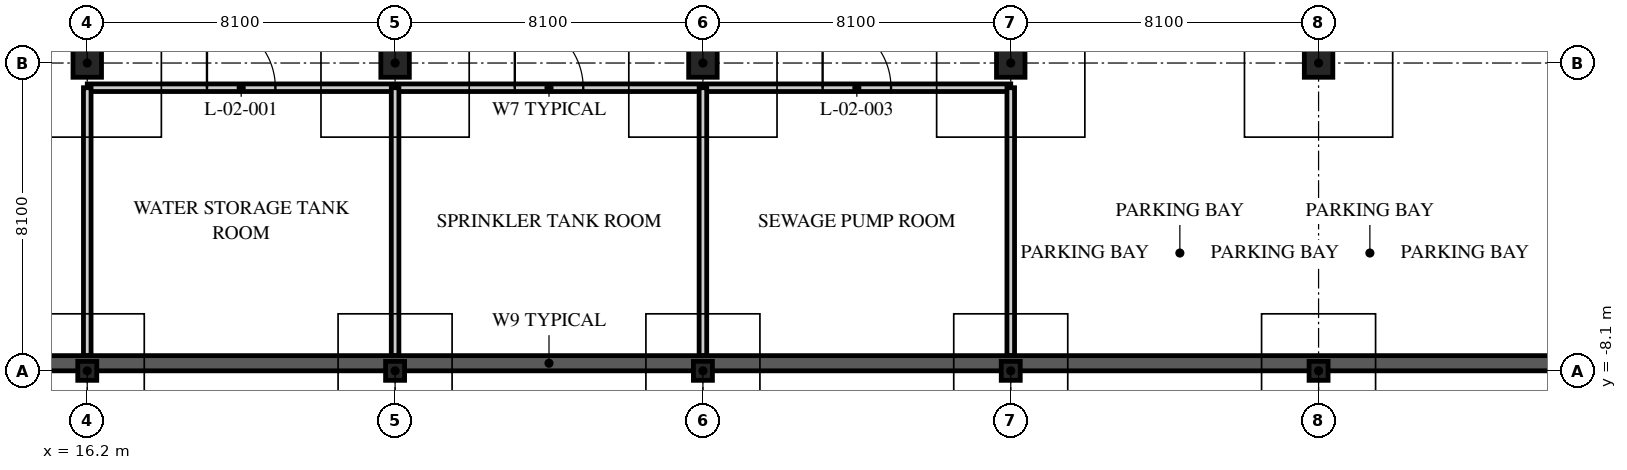
"""IFC4 building model, lengths in metres.
Left out: names, types, materials, properties, quantities, classifications, styles, units other than length and angle.
Written with IfcOpenShell. Run it as: python <this file> out.ifc"""

import sys

from ifc_helpers import new_model, si_unit, direction, frame, frame_2d, origin, origin_2d, place, context, subcontext, project, spatial, rectangle, hollow_rectangle, extrude, element, fill, save


model = new_model("IFC4")
c1 = context("Model", 3, precision=1e-05, world=origin(), true_north=direction((0.0, 1.0)))
c2 = subcontext(c1, "Body", "Model", "MODEL_VIEW")
j1 = project(units=[si_unit("LENGTHUNIT", "METRE"), si_unit("PLANEANGLEUNIT", "RADIAN")], contexts=[c1])
p1 = place(None, origin())
s1 = spatial("IfcSite", under=j1, at=p1, CompositionType="ELEMENT")
p2 = place(p1, origin())
s2 = spatial("IfcBuilding", under=s1, at=p2, CompositionType="ELEMENT")
p3 = place(p2, frame((0.0, 0.0, -8.4)))
s3 = spatial("IfcBuildingStorey", under=s2, at=p3, CompositionType="ELEMENT", Elevation=-8.4)
p4 = place(p3, frame((16.2, -8.1, 0.0), z_axis=(0.0, 0.0, 1.0), x_axis=(1.0, 0.0, 0.0)))
e1 = element("IfcColumn", 1, at=p4, inside=s3, PredefinedType="COLUMN", context=c2, shape_type="SweptSolid", body=[
    extrude(hollow_rectangle(XDim=0.5, YDim=0.5, WallThickness=0.03, at=origin_2d()), origin(), (0.0, 0.0, 1.0), 4.2),
])
p5 = place(p3, frame((16.2, 0.0, 0.0), z_axis=(0.0, 0.0, 1.0), x_axis=(1.0, 0.0, 0.0)))
e2 = element("IfcColumn", 2, at=p5, inside=s3, PredefinedType="COLUMN", context=c2, shape_type="SweptSolid", body=[
    extrude(hollow_rectangle(XDim=0.75, YDim=0.75, WallThickness=0.07, at=origin_2d()), origin(), (0.0, 0.0, 1.0), 4.2),
])
p6 = place(p3, frame((24.3, -8.1, 0.0), z_axis=(0.0, 0.0, 1.0), x_axis=(1.0, 0.0, 0.0)))
e3 = element("IfcColumn", 3, at=p6, inside=s3, PredefinedType="COLUMN", context=c2, shape_type="SweptSolid", body=[
    extrude(hollow_rectangle(XDim=0.5, YDim=0.5, WallThickness=0.03, at=origin_2d()), origin(), (0.0, 0.0, 1.0), 4.2),
])
p7 = place(p3, frame((24.3, 0.0, 0.0), z_axis=(0.0, 0.0, 1.0), x_axis=(1.0, 0.0, 0.0)))
e4 = element("IfcColumn", 4, at=p7, inside=s3, PredefinedType="COLUMN", context=c2, shape_type="SweptSolid", body=[
    extrude(hollow_rectangle(XDim=0.75, YDim=0.75, WallThickness=0.07, at=origin_2d()), origin(), (0.0, 0.0, 1.0), 4.2),
])
p8 = place(p3, frame((32.4, -8.1, 0.0), z_axis=(0.0, 0.0, 1.0), x_axis=(1.0, 0.0, 0.0)))
e5 = element("IfcColumn", 5, at=p8, inside=s3, PredefinedType="COLUMN", context=c2, shape_type="SweptSolid", body=[
    extrude(hollow_rectangle(XDim=0.5, YDim=0.5, WallThickness=0.03, at=origin_2d()), origin(), (0.0, 0.0, 1.0), 4.2),
])
p9 = place(p3, frame((32.4, 0.0, 0.0), z_axis=(0.0, 0.0, 1.0), x_axis=(1.0, 0.0, 0.0)))
e6 = element("IfcColumn", 6, at=p9, inside=s3, PredefinedType="COLUMN", context=c2, shape_type="SweptSolid", body=[
    extrude(hollow_rectangle(XDim=0.75, YDim=0.75, WallThickness=0.07, at=origin_2d()), origin(), (0.0, 0.0, 1.0), 4.2),
])
p10 = place(p3, frame((40.5, -8.1, 0.0), z_axis=(0.0, 0.0, 1.0), x_axis=(1.0, 0.0, 0.0)))
e7 = element("IfcColumn", 7, at=p10, inside=s3, PredefinedType="COLUMN", context=c2, shape_type="SweptSolid", body=[
    extrude(hollow_rectangle(XDim=0.5, YDim=0.5, WallThickness=0.03, at=origin_2d()), origin(), (0.0, 0.0, 1.0), 4.2),
])
p11 = place(p3, frame((40.5, 0.0, 0.0), z_axis=(0.0, 0.0, 1.0), x_axis=(1.0, 0.0, 0.0)))
e8 = element("IfcColumn", 8, at=p11, inside=s3, PredefinedType="COLUMN", context=c2, shape_type="SweptSolid", body=[
    extrude(hollow_rectangle(XDim=0.75, YDim=0.75, WallThickness=0.07, at=origin_2d()), origin(), (0.0, 0.0, 1.0), 4.2),
])
p12 = place(p3, frame((48.6, -8.1, 0.0), z_axis=(0.0, 0.0, 1.0), x_axis=(1.0, 0.0, 0.0)))
e9 = element("IfcColumn", 9, at=p12, inside=s3, PredefinedType="COLUMN", context=c2, shape_type="SweptSolid", body=[
    extrude(hollow_rectangle(XDim=0.5, YDim=0.5, WallThickness=0.03, at=origin_2d()), origin(), (0.0, 0.0, 1.0), 4.2),
])
p13 = place(p3, frame((48.6, 0.0, 0.0), z_axis=(0.0, 0.0, 1.0), x_axis=(1.0, 0.0, 0.0)))
e10 = element("IfcColumn", 10, at=p13, inside=s3, PredefinedType="COLUMN", context=c2, shape_type="SweptSolid", body=[
    extrude(hollow_rectangle(XDim=0.75, YDim=0.75, WallThickness=0.07, at=origin_2d()), origin(), (0.0, 0.0, 1.0), 4.2),
])
p14 = place(p3, frame((16.2, -0.65, 0.0), z_axis=(0.0, 0.0, 1.0), x_axis=(1.0, 0.0, 0.0)))
e11 = element("IfcWall", 11, at=p14, inside=s3, PredefinedType="SOLIDWALL", context=c2, shape_type="SweptSolid", body=[
    extrude(rectangle(XDim=24.3, YDim=0.2, at=frame_2d((12.15, 0.0))), origin(), (0.0, 0.0, 1.0), 3.95),
])
p15 = place(p14, frame((3.15, 0.0, 0.0)))
e12 = element("IfcOpeningElement", 12, at=p15, cuts=e11, PredefinedType="OPENING", context=c2, shape_type="SweptSolid", body=[
    extrude(rectangle(XDim=1.8, YDim=2.4, at=frame_2d((0.9, 1.2))), frame((0.0, 0.11, 0.0), z_axis=(0.0, -1.0, 0.0), x_axis=(1.0, 0.0, 0.0)), (0.0, 0.0, 1.0), 0.22),
])
p16 = place(p14, frame((11.25, 0.0, 0.0)))
e13 = element("IfcOpeningElement", 13, at=p16, cuts=e11, PredefinedType="OPENING", context=c2, shape_type="SweptSolid", body=[
    extrude(rectangle(XDim=1.8, YDim=2.4, at=frame_2d((0.9, 1.2))), frame((0.0, 0.11, 0.0), z_axis=(0.0, -1.0, 0.0), x_axis=(1.0, 0.0, 0.0)), (0.0, 0.0, 1.0), 0.22),
])
p17 = place(p14, frame((19.35, 0.0, 0.0)))
e14 = element("IfcOpeningElement", 14, at=p17, cuts=e11, PredefinedType="OPENING", context=c2, shape_type="SweptSolid", body=[
    extrude(rectangle(XDim=1.8, YDim=2.4, at=frame_2d((0.9, 1.2))), frame((0.0, 0.11, 0.0), z_axis=(0.0, -1.0, 0.0), x_axis=(1.0, 0.0, 0.0)), (0.0, 0.0, 1.0), 0.22),
])
for number, where, z_axis, x_axis in (
    (15, (16.2, -7.7, 0.0), (0.0, 0.0, 1.0), (0.0, 1.0, 0.0)),
    (16, (24.3, -7.7, 0.0), (0.0, 0.0, 1.0), (0.0, 1.0, 0.0)),
    (17, (32.4, -7.7, 0.0), (0.0, 0.0, 1.0), (0.0, 1.0, 0.0)),
    (18, (40.5, -7.7, 0.0), (0.0, 0.0, 1.0), (0.0, 1.0, 0.0)),
):
    element("IfcWall", number, at=place(p3, frame(where, z_axis=z_axis, x_axis=x_axis)), inside=s3, PredefinedType="SOLIDWALL", context=c2, shape_type="SweptSolid", body=[
        extrude(rectangle(XDim=7.05, YDim=0.2, at=frame_2d((3.525, 0.0))), origin(), (0.0, 0.0, 1.0), 3.338),
    ])
p18 = place(p3, frame((-7.9, -7.9, 0.0), z_axis=(0.0, 0.0, 1.0), x_axis=(1.0, 0.0, 0.0)))
e19 = element("IfcWall", 19, at=p18, inside=s3, PredefinedType="SOLIDWALL", context=c2, shape_type="SweptSolid", body=[
    extrude(rectangle(XDim=72.5, YDim=0.4, at=frame_2d((36.25, 0.0))), origin(), (0.0, 0.0, 1.0), 3.338),
])
p19 = place(p15, origin())
e20 = element("IfcDoor", 20, at=p19, inside=s3, OperationType="DOUBLE_DOOR_SINGLE_SWING", PredefinedType="DOOR", context=c2, shape_type="SweptSolid", body=[
    extrude(rectangle(XDim=1.8, YDim=2.4, at=frame_2d((0.9, 1.2))), frame((0.0, 0.025, 0.0), z_axis=(0.0, -1.0, 0.0), x_axis=(1.0, 0.0, 0.0)), (0.0, 0.0, 1.0), 0.05),
])
fill(e12, e20)
p20 = place(p16, origin())
e21 = element("IfcDoor", 21, at=p20, inside=s3, OperationType="DOUBLE_DOOR_SINGLE_SWING", PredefinedType="DOOR", context=c2, shape_type="SweptSolid", body=[
    extrude(rectangle(XDim=1.8, YDim=2.4, at=frame_2d((0.9, 1.2))), frame((0.0, 0.025, 0.0), z_axis=(0.0, -1.0, 0.0), x_axis=(1.0, 0.0, 0.0)), (0.0, 0.0, 1.0), 0.05),
])
fill(e13, e21)
p21 = place(p17, origin())
e22 = element("IfcDoor", 22, at=p21, inside=s3, OperationType="DOUBLE_DOOR_SINGLE_SWING", PredefinedType="DOOR", context=c2, shape_type="SweptSolid", body=[
    extrude(rectangle(XDim=1.8, YDim=2.4, at=frame_2d((0.9, 1.2))), frame((0.0, 0.025, 0.0), z_axis=(0.0, -1.0, 0.0), x_axis=(1.0, 0.0, 0.0)), (0.0, 0.0, 1.0), 0.05),
])
fill(e14, e22)
save(model, sys.argv[1])
